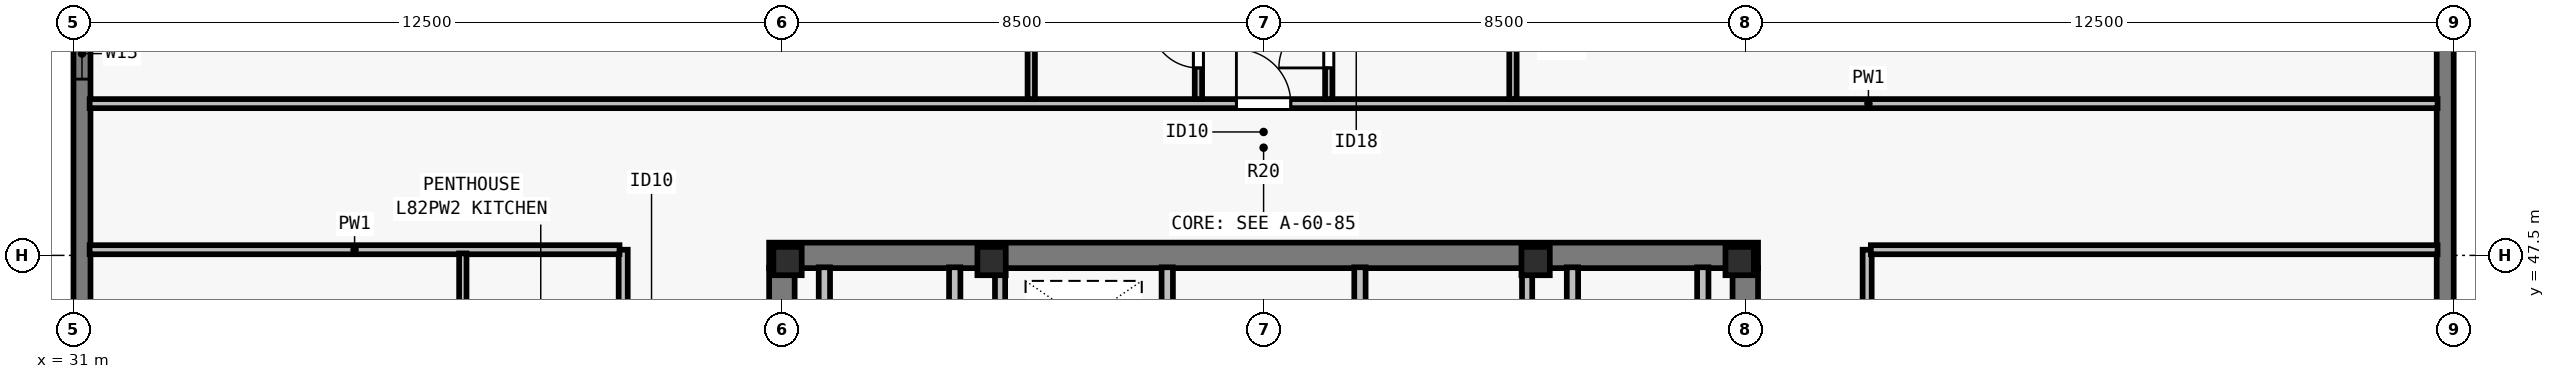
"""IFC4 building model, lengths in metres.
Left out: names, types, materials, properties, quantities, classifications, styles, units other than length and angle.
Written with IfcOpenShell. Run it as: python <this file> out.ifc"""

import sys

from ifc_helpers import new_model, si_unit, direction, frame, frame_2d, origin, origin_2d, place, context, subcontext, project, spatial, rectangle, i_section, extrude, element, fill, save


model = new_model("IFC4")
c1 = context("Model", 3, precision=1e-05, world=origin(), true_north=direction((0.0, 1.0)))
c2 = subcontext(c1, "Body", "Model", "MODEL_VIEW")
j1 = project(units=[si_unit("LENGTHUNIT", "METRE"), si_unit("PLANEANGLEUNIT", "RADIAN")], contexts=[c1])
p1 = place(None, origin())
s1 = spatial("IfcSite", under=j1, at=p1, CompositionType="ELEMENT")
p2 = place(p1, origin())
s2 = spatial("IfcBuilding", under=s1, at=p2, CompositionType="ELEMENT")
p3 = place(p2, frame((0.0, 0.0, 298.0)))
s3 = spatial("IfcBuildingStorey", under=s2, at=p3, CompositionType="ELEMENT", Elevation=298.0)
for number, where, z_axis, x_axis in (
    (1, (43.6, 47.4, 0.0), (0.0, 0.0, 1.0), (1.0, 0.0, 0.0)),
    (2, (47.2, 47.4, 0.0), (0.0, 0.0, 1.0), (1.0, 0.0, 0.0)),
    (3, (56.8, 47.4, 0.0), (0.0, 0.0, 1.0), (1.0, 0.0, 0.0)),
    (4, (60.4, 47.4, 0.0), (0.0, 0.0, 1.0), (1.0, 0.0, 0.0)),
):
    element("IfcColumn", number, at=place(p3, frame(where, z_axis=z_axis, x_axis=x_axis)), inside=s3, PredefinedType="COLUMN", context=c2, shape_type="SweptSolid", body=[
        extrude(i_section(OverallWidth=0.5, OverallDepth=0.5, WebThickness=0.028, FlangeThickness=0.045, at=origin_2d()), origin(), (0.0, 0.0, 1.0), 3.5),
    ])
p4 = place(p3, frame((31.15, 23.5, 0.0), z_axis=(0.0, 0.0, 1.0), x_axis=(0.0, 1.0, 0.0)))
e5 = element("IfcWall", 5, at=p4, inside=s3, PredefinedType="SOLIDWALL", context=c2, shape_type="SweptSolid", body=[
    extrude(rectangle(XDim=30.722, YDim=0.3, at=frame_2d((15.361, 0.0))), origin(), (0.0, 0.0, 1.0), 3.29),
])
p5 = place(p4, frame((4.944, 0.0, 0.8)))
e6 = element("IfcOpeningElement", 6, at=p5, cuts=e5, PredefinedType="OPENING", context=c2, shape_type="SweptSolid", body=[
    extrude(rectangle(XDim=1.65, YDim=1.758, at=frame_2d((0.825, 0.879))), frame((0.0, 0.16, 0.0), z_axis=(0.0, -1.0, 0.0), x_axis=(1.0, 0.0, 0.0)), (0.0, 0.0, 1.0), 0.32),
])
p6 = place(p4, frame((7.355, 0.0, 0.8)))
e7 = element("IfcOpeningElement", 7, at=p6, cuts=e5, PredefinedType="OPENING", context=c2, shape_type="SweptSolid", body=[
    extrude(rectangle(XDim=2.0, YDim=1.758, at=frame_2d((1.0, 0.879))), frame((0.0, 0.16, 0.0), z_axis=(0.0, -1.0, 0.0), x_axis=(1.0, 0.0, 0.0)), (0.0, 0.0, 1.0), 0.32),
])
p7 = place(p4, frame((12.617, 0.0, 0.8)))
e8 = element("IfcOpeningElement", 8, at=p7, cuts=e5, PredefinedType="OPENING", context=c2, shape_type="SweptSolid", body=[
    extrude(rectangle(XDim=1.65, YDim=1.758, at=frame_2d((0.825, 0.879))), frame((0.0, 0.16, 0.0), z_axis=(0.0, -1.0, 0.0), x_axis=(1.0, 0.0, 0.0)), (0.0, 0.0, 1.0), 0.32),
])
p8 = place(p4, frame((16.28, 0.0, 0.8)))
e9 = element("IfcOpeningElement", 9, at=p8, cuts=e5, PredefinedType="OPENING", context=c2, shape_type="SweptSolid", body=[
    extrude(rectangle(XDim=2.0, YDim=1.758, at=frame_2d((1.0, 0.879))), frame((0.0, 0.16, 0.0), z_axis=(0.0, -1.0, 0.0), x_axis=(1.0, 0.0, 0.0)), (0.0, 0.0, 1.0), 0.32),
])
p9 = place(p4, frame((21.142, 0.0, 0.8)))
e10 = element("IfcOpeningElement", 10, at=p9, cuts=e5, PredefinedType="OPENING", context=c2, shape_type="SweptSolid", body=[
    extrude(rectangle(XDim=1.65, YDim=1.758, at=frame_2d((0.825, 0.879))), frame((0.0, 0.16, 0.0), z_axis=(0.0, -1.0, 0.0), x_axis=(1.0, 0.0, 0.0)), (0.0, 0.0, 1.0), 0.32),
])
p10 = place(p4, frame((27.11, 0.0, 0.8)))
e11 = element("IfcOpeningElement", 11, at=p10, cuts=e5, PredefinedType="OPENING", context=c2, shape_type="SweptSolid", body=[
    extrude(rectangle(XDim=0.9, YDim=1.75, at=frame_2d((0.45, 0.875))), frame((0.0, 0.16, 0.0), z_axis=(0.0, -1.0, 0.0), x_axis=(1.0, 0.0, 0.0)), (0.0, 0.0, 1.0), 0.32),
])
p11 = place(p3, frame((72.85, 54.5, 0.0), z_axis=(0.0, 0.0, 1.0), x_axis=(0.0, -1.0, 0.0)))
e12 = element("IfcWall", 12, at=p11, inside=s3, PredefinedType="SOLIDWALL", context=c2, shape_type="SweptSolid", body=[
    extrude(rectangle(XDim=20.622, YDim=0.3, at=frame_2d((10.311, 0.0))), origin(), (0.0, 0.0, 1.0), 3.29),
])
p12 = place(p11, frame((7.821, 0.0, 0.8)))
e13 = element("IfcOpeningElement", 13, at=p12, cuts=e12, PredefinedType="OPENING", context=c2, shape_type="SweptSolid", body=[
    extrude(rectangle(XDim=2.0, YDim=1.758, at=frame_2d((1.0, 0.879))), frame((0.0, 0.16, 0.0), z_axis=(0.0, -1.0, 0.0), x_axis=(1.0, 0.0, 0.0)), (0.0, 0.0, 1.0), 0.32),
])
p13 = place(p11, frame((12.726, 0.0, 0.8)))
e14 = element("IfcOpeningElement", 14, at=p13, cuts=e12, PredefinedType="OPENING", context=c2, shape_type="SweptSolid", body=[
    extrude(rectangle(XDim=1.65, YDim=1.758, at=frame_2d((0.825, 0.879))), frame((0.0, 0.16, 0.0), z_axis=(0.0, -1.0, 0.0), x_axis=(1.0, 0.0, 0.0)), (0.0, 0.0, 1.0), 0.32),
])
p14 = place(p11, frame((16.432, 0.0, 0.8)))
e15 = element("IfcOpeningElement", 15, at=p14, cuts=e12, PredefinedType="OPENING", context=c2, shape_type="SweptSolid", body=[
    extrude(rectangle(XDim=2.0, YDim=1.758, at=frame_2d((1.0, 0.879))), frame((0.0, 0.16, 0.0), z_axis=(0.0, -1.0, 0.0), x_axis=(1.0, 0.0, 0.0)), (0.0, 0.0, 1.0), 0.32),
])
p15 = place(p3, frame((43.275, 47.5, 0.0), z_axis=(0.0, 0.0, 1.0), x_axis=(1.0, 0.0, 0.0)))
e16 = element("IfcWall", 16, at=p15, inside=s3, PredefinedType="SHEAR", context=c2, shape_type="SweptSolid", body=[
    extrude(rectangle(XDim=17.45, YDim=0.45, at=frame_2d((8.725, 0.0))), origin(), (0.0, 0.0, 1.0), 3.29),
])
for number, where, z_axis, x_axis in (
    (17, (43.5, 40.8, 0.0), (0.0, 0.0, 1.0), (0.0, 1.0, 0.0)),
    (18, (60.5, 40.8, 0.0), (0.0, 0.0, 1.0), (0.0, 1.0, 0.0)),
):
    element("IfcWall", number, at=place(p3, frame(where, z_axis=z_axis, x_axis=x_axis)), inside=s3, PredefinedType="SHEAR", context=c2, shape_type="SweptSolid", body=[
        extrude(rectangle(XDim=6.485, YDim=0.45, at=frame_2d((3.242, 0.0))), origin(), (0.0, 0.0, 1.0), 3.29),
    ])
p16 = place(p3, frame((50.3, 40.585, 0.0), z_axis=(0.0, 0.0, 1.0), x_axis=(0.0, 1.0, 0.0)))
e19 = element("IfcWall", 19, at=p16, inside=s3, PredefinedType="SOLIDWALL", context=c2, shape_type="SweptSolid", body=[
    extrude(rectangle(XDim=6.705, YDim=0.2, at=frame_2d((3.353, 0.0))), origin(), (0.0, 0.0, 1.0), 3.29),
])
p17 = place(p16, frame((0.515, 0.0, 0.0)))
e20 = element("IfcOpeningElement", 20, at=p17, cuts=e19, PredefinedType="OPENING", context=c2, shape_type="SweptSolid", body=[
    extrude(rectangle(XDim=1.1, YDim=2.2, at=frame_2d((0.55, 1.1))), frame((0.0, 0.11, 0.0), z_axis=(0.0, -1.0, 0.0), x_axis=(1.0, 0.0, 0.0)), (0.0, 0.0, 1.0), 0.22),
])
p18 = place(p16, frame((3.015, 0.0, 0.0)))
e21 = element("IfcOpeningElement", 21, at=p18, cuts=e19, PredefinedType="OPENING", context=c2, shape_type="SweptSolid", body=[
    extrude(rectangle(XDim=1.1, YDim=2.2, at=frame_2d((0.55, 1.1))), frame((0.0, 0.11, 0.0), z_axis=(0.0, -1.0, 0.0), x_axis=(1.0, 0.0, 0.0)), (0.0, 0.0, 1.0), 0.22),
])
p19 = place(p16, frame((5.065, 0.0, 0.0)))
e22 = element("IfcOpeningElement", 22, at=p19, cuts=e19, PredefinedType="OPENING", context=c2, shape_type="SweptSolid", body=[
    extrude(rectangle(XDim=0.8, YDim=2.08, at=frame_2d((0.4, 1.04))), frame((0.0, 0.11, 0.0), z_axis=(0.0, -1.0, 0.0), x_axis=(1.0, 0.0, 0.0)), (0.0, 0.0, 1.0), 0.22),
])
p20 = place(p3, frame((53.7, 40.585, 0.0), z_axis=(0.0, 0.0, 1.0), x_axis=(0.0, 1.0, 0.0)))
e23 = element("IfcWall", 23, at=p20, inside=s3, PredefinedType="SOLIDWALL", context=c2, shape_type="SweptSolid", body=[
    extrude(rectangle(XDim=6.705, YDim=0.2, at=frame_2d((3.353, 0.0))), origin(), (0.0, 0.0, 1.0), 3.29),
])
p21 = place(p20, frame((0.195, 0.0, 0.0)))
e24 = element("IfcOpeningElement", 24, at=p21, cuts=e23, PredefinedType="OPENING", context=c2, shape_type="SweptSolid", body=[
    extrude(rectangle(XDim=0.8, YDim=2.08, at=frame_2d((0.4, 1.04))), frame((0.0, 0.11, 0.0), z_axis=(0.0, -1.0, 0.0), x_axis=(1.0, 0.0, 0.0)), (0.0, 0.0, 1.0), 0.22),
])
p22 = place(p20, frame((1.865, 0.0, 0.0)))
e25 = element("IfcOpeningElement", 25, at=p22, cuts=e23, PredefinedType="OPENING", context=c2, shape_type="SweptSolid", body=[
    extrude(rectangle(XDim=1.1, YDim=2.2, at=frame_2d((0.55, 1.1))), frame((0.0, 0.11, 0.0), z_axis=(0.0, -1.0, 0.0), x_axis=(1.0, 0.0, 0.0)), (0.0, 0.0, 1.0), 0.22),
])
p23 = place(p20, frame((4.265, 0.0, 0.0)))
e26 = element("IfcOpeningElement", 26, at=p23, cuts=e23, PredefinedType="OPENING", context=c2, shape_type="SweptSolid", body=[
    extrude(rectangle(XDim=0.95, YDim=2.12, at=frame_2d((0.475, 1.06))), frame((0.0, 0.11, 0.0), z_axis=(0.0, -1.0, 0.0), x_axis=(1.0, 0.0, 0.0)), (0.0, 0.0, 1.0), 0.22),
])
for number, where, z_axis, x_axis in (
    (27, (46.55, 43.735, 0.0), (0.0, 0.0, 1.0), (0.0, 1.0, 0.0)),
    (28, (44.25, 43.735, 0.0), (0.0, 0.0, 1.0), (0.0, 1.0, 0.0)),
    (29, (57.45, 43.735, 0.0), (0.0, 0.0, 1.0), (0.0, 1.0, 0.0)),
    (30, (59.75, 43.735, 0.0), (0.0, 0.0, 1.0), (0.0, 1.0, 0.0)),
):
    element("IfcWall", number, at=place(p3, frame(where, z_axis=z_axis, x_axis=x_axis)), inside=s3, PredefinedType="SOLIDWALL", context=c2, shape_type="SweptSolid", body=[
        extrude(rectangle(XDim=3.555, YDim=0.2, at=frame_2d((1.777, 0.0))), origin(), (0.0, 0.0, 1.0), 3.29),
    ])
for number, where, z_axis, x_axis in (
    (31, (47.35, 43.735, 0.0), (0.0, 0.0, 1.0), (0.0, 1.0, 0.0)),
    (32, (56.65, 43.735, 0.0), (0.0, 0.0, 1.0), (0.0, 1.0, 0.0)),
):
    element("IfcWall", number, at=place(p3, frame(where, z_axis=z_axis, x_axis=x_axis)), inside=s3, PredefinedType="SOLIDWALL", context=c2, shape_type="SweptSolid", body=[
        extrude(rectangle(XDim=3.555, YDim=0.18, at=frame_2d((1.777, 0.0))), origin(), (0.0, 0.0, 1.0), 3.29),
    ])
p24 = place(p3, frame((31.285, 50.177, 0.0), z_axis=(0.0, 0.0, 1.0), x_axis=(1.0, 0.0, 0.0)))
e33 = element("IfcWall", 33, at=p24, inside=s3, PredefinedType="PARTITIONING", context=c2, shape_type="SweptSolid", body=[
    extrude(rectangle(XDim=41.43, YDim=0.16, at=frame_2d((20.715, 0.0))), origin(), (0.0, 0.0, 1.0), 3.009),
])
p25 = place(p24, frame((20.235, 0.0, 0.0)))
e34 = element("IfcOpeningElement", 34, at=p25, cuts=e33, PredefinedType="OPENING", context=c2, shape_type="SweptSolid", body=[
    extrude(rectangle(XDim=0.96, YDim=2.18, at=frame_2d((0.48, 1.09))), frame((0.0, 0.09, 0.0), z_axis=(0.0, -1.0, 0.0), x_axis=(1.0, 0.0, 0.0)), (0.0, 0.0, 1.0), 0.18),
])
p26 = place(p3, frame((40.7, 30.4, 0.0), z_axis=(0.0, 0.0, 1.0), x_axis=(0.0, 1.0, 0.0)))
e35 = element("IfcWall", 35, at=p26, inside=s3, PredefinedType="PARTITIONING", context=c2, shape_type="SweptSolid", body=[
    extrude(rectangle(XDim=17.2, YDim=0.16, at=frame_2d((8.6, 0.0))), origin(), (0.0, 0.0, 1.0), 3.009),
])
p27 = place(p26, frame((3.82, 0.0, 0.0)))
e36 = element("IfcOpeningElement", 36, at=p27, cuts=e35, PredefinedType="OPENING", context=c2, shape_type="SweptSolid", body=[
    extrude(rectangle(XDim=0.96, YDim=2.18, at=frame_2d((0.48, 1.09))), frame((0.0, 0.09, 0.0), z_axis=(0.0, -1.0, 0.0), x_axis=(1.0, 0.0, 0.0)), (0.0, 0.0, 1.0), 0.18),
])
p28 = place(p26, frame((12.42, 0.0, 0.0)))
e37 = element("IfcOpeningElement", 37, at=p28, cuts=e35, PredefinedType="OPENING", context=c2, shape_type="SweptSolid", body=[
    extrude(rectangle(XDim=0.96, YDim=2.18, at=frame_2d((0.48, 1.09))), frame((0.0, 0.09, 0.0), z_axis=(0.0, -1.0, 0.0), x_axis=(1.0, 0.0, 0.0)), (0.0, 0.0, 1.0), 0.18),
])
p29 = place(p3, frame((62.65, 30.4, 0.0), z_axis=(0.0, 0.0, 1.0), x_axis=(0.0, 1.0, 0.0)))
e38 = element("IfcWall", 38, at=p29, inside=s3, PredefinedType="PARTITIONING", context=c2, shape_type="SweptSolid", body=[
    extrude(rectangle(XDim=17.2, YDim=0.16, at=frame_2d((8.6, 0.0))), origin(), (0.0, 0.0, 1.0), 3.29),
])
p30 = place(p29, frame((8.0, 0.0, 0.0)))
e39 = element("IfcOpeningElement", 39, at=p30, cuts=e38, PredefinedType="OPENING", context=c2, shape_type="SweptSolid", body=[
    extrude(rectangle(XDim=0.96, YDim=2.12, at=frame_2d((0.48, 1.06))), frame((0.0, 0.09, 0.0), z_axis=(0.0, -1.0, 0.0), x_axis=(1.0, 0.0, 0.0)), (0.0, 0.0, 1.0), 0.18),
])
p31 = place(p3, frame((31.285, 47.6, 0.0), z_axis=(0.0, 0.0, 1.0), x_axis=(1.0, 0.0, 0.0)))
e40 = element("IfcWall", 40, at=p31, inside=s3, PredefinedType="PARTITIONING", context=c2, shape_type="SweptSolid", body=[
    extrude(rectangle(XDim=9.35, YDim=0.16, at=frame_2d((4.675, 0.0))), origin(), (0.0, 0.0, 1.0), 3.29),
])
p32 = place(p3, frame((62.715, 47.6, 0.0), z_axis=(0.0, 0.0, 1.0), x_axis=(1.0, 0.0, 0.0)))
e41 = element("IfcWall", 41, at=p32, inside=s3, PredefinedType="PARTITIONING", context=c2, shape_type="SweptSolid", body=[
    extrude(rectangle(XDim=10.0, YDim=0.16, at=frame_2d((5.0, 0.0))), origin(), (0.0, 0.0, 1.0), 3.29),
])
p33 = place(p3, frame((47.9, 50.258, 0.0), z_axis=(0.0, 0.0, 1.0), x_axis=(0.0, 1.0, 0.0)))
e42 = element("IfcWall", 42, at=p33, inside=s3, PredefinedType="PLUMBINGWALL", context=c2, shape_type="SweptSolid", body=[
    extrude(rectangle(XDim=2.75, YDim=0.13, at=frame_2d((1.375, 0.0))), origin(), (0.0, 0.0, 1.0), 3.29),
])
p34 = place(p3, frame((50.85, 50.258, 0.0), z_axis=(0.0, 0.0, 1.0), x_axis=(0.0, 1.0, 0.0)))
e43 = element("IfcWall", 43, at=p34, inside=s3, PredefinedType="PLUMBINGWALL", context=c2, shape_type="SweptSolid", body=[
    extrude(rectangle(XDim=2.75, YDim=0.13, at=frame_2d((1.375, 0.0))), origin(), (0.0, 0.0, 1.0), 3.009),
])
p35 = place(p34, frame((0.55, 0.0, 0.0)))
e44 = element("IfcOpeningElement", 44, at=p35, cuts=e43, PredefinedType="OPENING", context=c2, shape_type="SweptSolid", body=[
    extrude(rectangle(XDim=0.85, YDim=2.08, at=frame_2d((0.425, 1.04))), frame((0.0, 0.075, 0.0), z_axis=(0.0, -1.0, 0.0), x_axis=(1.0, 0.0, 0.0)), (0.0, 0.0, 1.0), 0.15),
])
p36 = place(p3, frame((56.4, 50.258, 0.0), z_axis=(0.0, 0.0, 1.0), x_axis=(0.0, 1.0, 0.0)))
e45 = element("IfcWall", 45, at=p36, inside=s3, PredefinedType="PLUMBINGWALL", context=c2, shape_type="SweptSolid", body=[
    extrude(rectangle(XDim=2.75, YDim=0.13, at=frame_2d((1.375, 0.0))), origin(), (0.0, 0.0, 1.0), 3.29),
])
p37 = place(p3, frame((53.15, 50.258, 0.0), z_axis=(0.0, 0.0, 1.0), x_axis=(0.0, 1.0, 0.0)))
e46 = element("IfcWall", 46, at=p37, inside=s3, PredefinedType="PLUMBINGWALL", context=c2, shape_type="SweptSolid", body=[
    extrude(rectangle(XDim=2.75, YDim=0.13, at=frame_2d((1.375, 0.0))), origin(), (0.0, 0.0, 1.0), 3.29),
])
p38 = place(p37, frame((0.55, 0.0, 0.0)))
e47 = element("IfcOpeningElement", 47, at=p38, cuts=e46, PredefinedType="OPENING", context=c2, shape_type="SweptSolid", body=[
    extrude(rectangle(XDim=0.88, YDim=2.1, at=frame_2d((0.44, 1.05))), frame((0.0, 0.075, 0.0), z_axis=(0.0, -1.0, 0.0), x_axis=(1.0, 0.0, 0.0)), (0.0, 0.0, 1.0), 0.15),
])
p39 = place(p3, frame((37.87, 44.5, 0.0), z_axis=(0.0, 0.0, 1.0), x_axis=(0.0, 1.0, 0.0)))
e48 = element("IfcWall", 48, at=p39, inside=s3, PredefinedType="PLUMBINGWALL", context=c2, shape_type="SweptSolid", body=[
    extrude(rectangle(XDim=3.035, YDim=0.13, at=frame_2d((1.518, 0.0))), origin(), (0.0, 0.0, 1.0), 3.29),
])
p40 = place(p10, origin())
e49 = element("IfcWindow", 49, at=p40, inside=s3, PartitioningType="SINGLE_PANEL", PredefinedType="WINDOW", context=c2, shape_type="SweptSolid", body=[
    extrude(rectangle(XDim=0.9, YDim=1.75, at=frame_2d((0.45, 0.875))), frame((0.0, -0.04, 0.0), z_axis=(0.0, -1.0, 0.0), x_axis=(1.0, 0.0, 0.0)), (0.0, 0.0, 1.0), 0.06),
])
fill(e11, e49)
p41 = place(p35, origin())
e50 = element("IfcDoor", 50, at=p41, inside=s3, OperationType="SINGLE_SWING_RIGHT", PredefinedType="DOOR", context=c2, shape_type="SweptSolid", body=[
    extrude(rectangle(XDim=0.85, YDim=2.08, at=frame_2d((0.425, 1.04))), frame((0.0, 0.025, 0.0), z_axis=(0.0, -1.0, 0.0), x_axis=(1.0, 0.0, 0.0)), (0.0, 0.0, 1.0), 0.05),
])
fill(e44, e50)
p42 = place(p38, origin())
e51 = element("IfcDoor", 51, at=p42, inside=s3, OperationType="SINGLE_SWING_LEFT", PredefinedType="DOOR", context=c2, shape_type="SweptSolid", body=[
    extrude(rectangle(XDim=0.88, YDim=2.1, at=frame_2d((0.44, 1.05))), frame((0.0, 0.025, 0.0), z_axis=(0.0, -1.0, 0.0), x_axis=(1.0, 0.0, 0.0)), (0.0, 0.0, 1.0), 0.05),
])
fill(e47, e51)
p43 = place(p25, origin())
e52 = element("IfcDoor", 52, at=p43, inside=s3, OperationType="SINGLE_SWING_LEFT", PredefinedType="DOOR", context=c2, shape_type="SweptSolid", body=[
    extrude(rectangle(XDim=0.96, YDim=2.18, at=frame_2d((0.48, 1.09))), frame((0.0, 0.025, 0.0), z_axis=(0.0, -1.0, 0.0), x_axis=(1.0, 0.0, 0.0)), (0.0, 0.0, 1.0), 0.05),
])
fill(e34, e52)
save(model, sys.argv[1])
